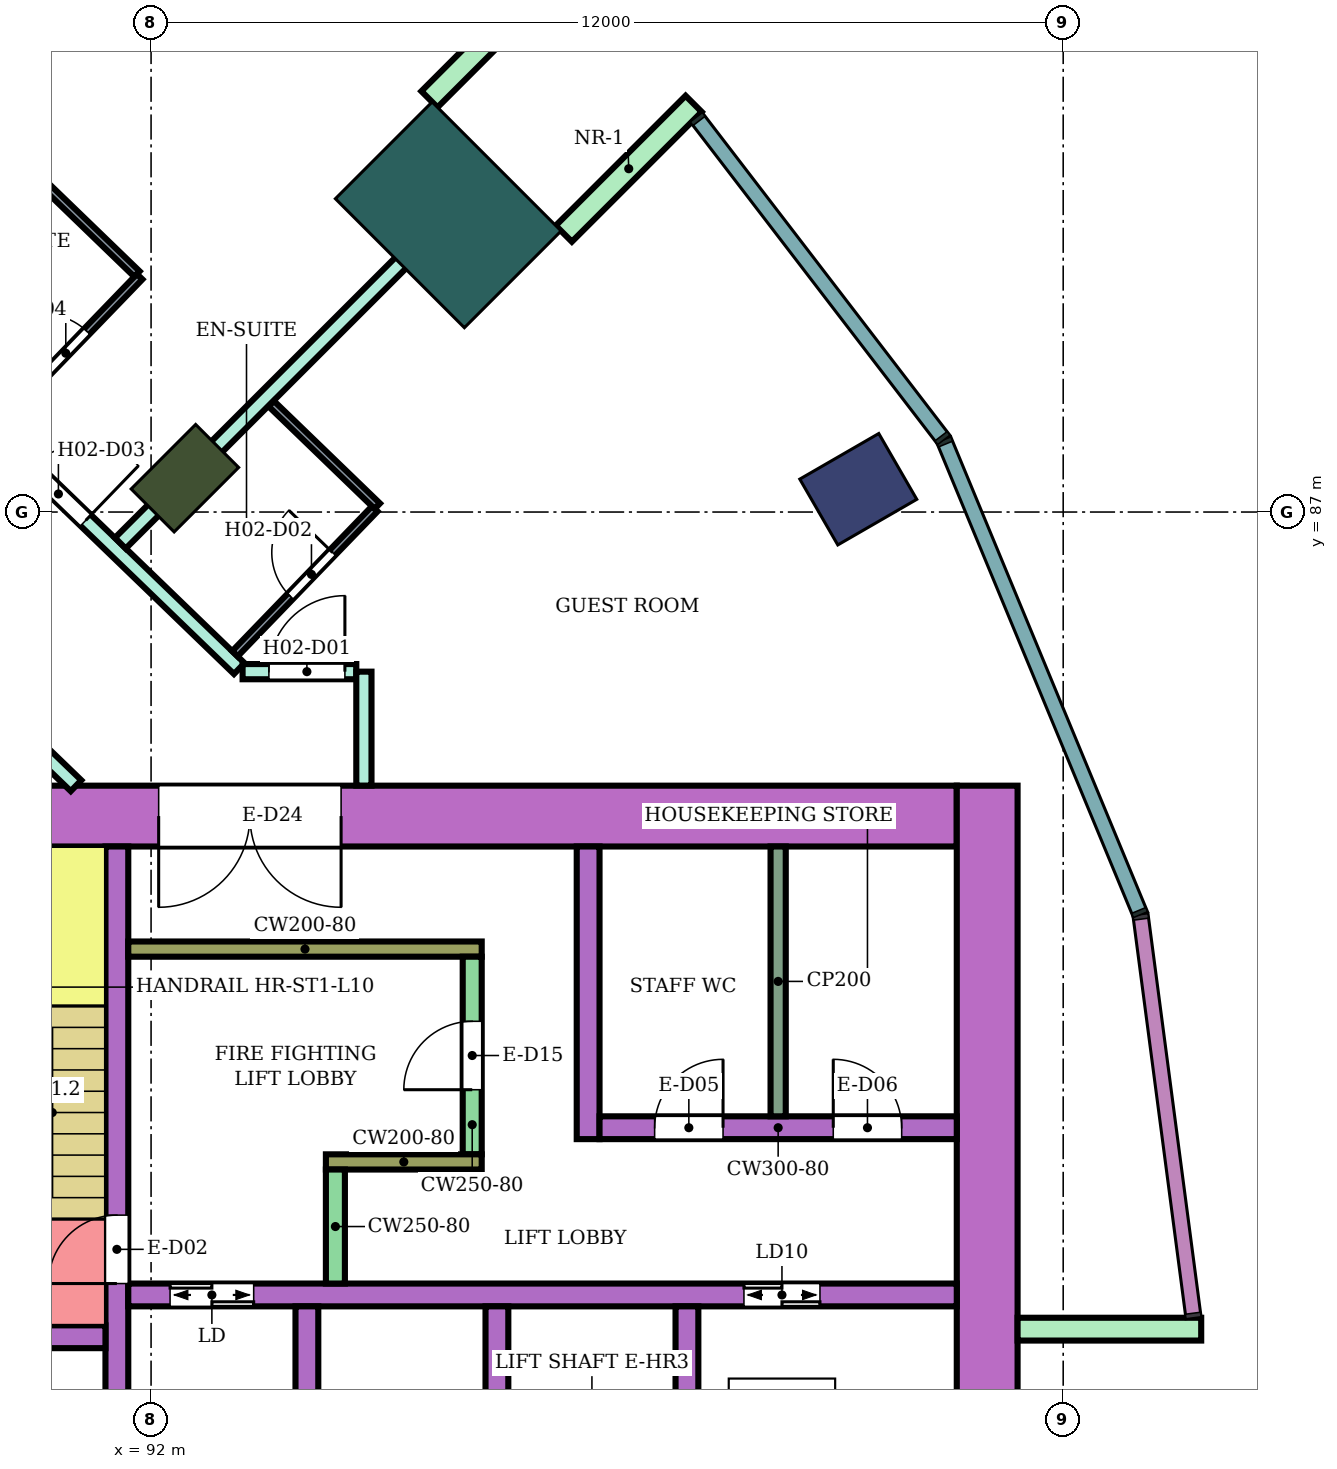
"""IFC4 building model, lengths in metres.
Left out: names, types, materials, properties, quantities, classifications, styles, units other than length and angle.
Written with IfcOpenShell. Run it as: python <this file> out.ifc"""

import sys

from ifc_helpers import new_model, si_unit, direction, frame, frame_2d, origin, origin_2d, place, context, subcontext, project, spatial, rectangle, extrude, element, fill, save


model = new_model("IFC4")
c1 = context("Model", 3, precision=1e-05, world=origin(), true_north=direction((0.0, 1.0)))
c2 = subcontext(c1, "Body", "Model", "MODEL_VIEW")
j1 = project(units=[si_unit("LENGTHUNIT", "METRE"), si_unit("PLANEANGLEUNIT", "RADIAN")], contexts=[c1])
p1 = place(None, origin())
s1 = spatial("IfcSite", under=j1, at=p1, CompositionType="ELEMENT")
p2 = place(p1, origin())
s2 = spatial("IfcBuilding", under=s1, at=p2, CompositionType="ELEMENT")
p3 = place(p2, frame((0.0, 0.0, 47.8)))
s3 = spatial("IfcBuildingStorey", under=s2, at=p3, CompositionType="ELEMENT", Elevation=47.8)
p4 = place(p3, frame((101.304, 87.3, 0.0), z_axis=(0.0, 0.0, 1.0), x_axis=(0.866025403784, 0.5, 0.0)))
e1 = element("IfcColumn", 1, at=p4, inside=s3, PredefinedType="COLUMN", context=c2, shape_type="SweptSolid", body=[
    extrude(rectangle(XDim=1.2, YDim=1.0, at=origin_2d()), origin(), (0.0, 0.0, 1.0), 3.8),
])
p5 = place(p3, frame((92.445, 87.445, 0.0), z_axis=(0.0, 0.0, 1.0), x_axis=(0.707106781187, 0.707106781187, 0.0)))
e2 = element("IfcColumn", 2, at=p5, inside=s3, PredefinedType="COLUMN", context=c2, shape_type="SweptSolid", body=[
    extrude(rectangle(XDim=1.2, YDim=0.8, at=origin_2d()), origin(), (0.0, 0.0, 1.0), 3.8),
])
p6 = place(p3, frame((95.91, 90.91, 0.0), z_axis=(0.0, 0.0, 1.0), x_axis=(0.707106781187, 0.707106781187, 0.0)))
e3 = element("IfcColumn", 3, at=p6, inside=s3, PredefinedType="COLUMN", context=c2, shape_type="SweptSolid", body=[
    extrude(rectangle(XDim=1.8, YDim=2.4, at=origin_2d()), origin(), (0.0, 0.0, 1.0), 3.8),
])
p7 = place(p3, frame((87.9, 83.0, 0.0), z_axis=(0.0, 0.0, 1.0), x_axis=(1.0, 0.0, 0.0)))
e4 = element("IfcWall", 4, at=p7, inside=s3, PredefinedType="SHEAR", context=c2, shape_type="SweptSolid", body=[
    extrude(rectangle(XDim=14.7, YDim=0.8, at=frame_2d((7.35, 0.0))), origin(), (0.0, 0.0, 1.0), 3.48),
])
p8 = place(p7, frame((4.2, 0.0, 0.0)))
e5 = element("IfcOpeningElement", 5, at=p8, cuts=e4, PredefinedType="OPENING", context=c2, shape_type="SweptSolid", body=[
    extrude(rectangle(XDim=2.4, YDim=2.4, at=frame_2d((1.2, 1.2))), frame((0.0, 0.41, 0.0), z_axis=(0.0, -1.0, 0.0), x_axis=(1.0, 0.0, 0.0)), (0.0, 0.0, 1.0), 0.82),
])
p9 = place(p3, frame((103.0, 66.6, 0.0), z_axis=(0.0, 0.0, 1.0), x_axis=(0.0, 1.0, 0.0)))
e6 = element("IfcWall", 6, at=p9, inside=s3, PredefinedType="SHEAR", context=c2, shape_type="SweptSolid", body=[
    extrude(rectangle(XDim=16.8, YDim=0.8, at=frame_2d((8.4, 0.0))), origin(), (0.0, 0.0, 1.0), 3.48),
])
p10 = place(p3, frame((91.55, 75.0, 0.0), z_axis=(0.0, 0.0, 1.0), x_axis=(0.0, 1.0, 0.0)))
e7 = element("IfcWall", 7, at=p10, inside=s3, PredefinedType="SHEAR", context=c2, shape_type="SweptSolid", body=[
    extrude(rectangle(XDim=7.6, YDim=0.3, at=frame_2d((3.8, 0.0))), origin(), (0.0, 0.0, 1.0), 3.48),
])
p11 = place(p10, frame((1.85, 0.0, 0.0)))
e8 = element("IfcOpeningElement", 8, at=p11, cuts=e7, PredefinedType="OPENING", context=c2, shape_type="SweptSolid", body=[
    extrude(rectangle(XDim=0.9, YDim=2.1, at=frame_2d((0.45, 1.05))), frame((0.0, 0.16, 0.0), z_axis=(0.0, -1.0, 0.0), x_axis=(1.0, 0.0, 0.0)), (0.0, 0.0, 1.0), 0.32),
])
p12 = place(p3, frame((88.35, 76.15, 0.0), z_axis=(0.0, 0.0, 1.0), x_axis=(1.0, 0.0, 0.0)))
e9 = element("IfcWall", 9, at=p12, inside=s3, PredefinedType="SHEAR", context=c2, shape_type="SweptSolid", body=[
    extrude(rectangle(XDim=3.05, YDim=0.3, at=frame_2d((1.525, 0.0))), origin(), (0.0, 0.0, 1.0), 3.48),
])
p13 = place(p12, frame((1.1, 0.0, 0.0)))
e10 = element("IfcOpeningElement", 10, at=p13, cuts=e9, PredefinedType="OPENING", context=c2, shape_type="SweptSolid", body=[
    extrude(rectangle(XDim=0.7, YDim=2.0, at=frame_2d((0.35, 1.0))), frame((0.0, 0.16, 0.0), z_axis=(0.0, -1.0, 0.0), x_axis=(1.0, 0.0, 0.0)), (0.0, 0.0, 1.0), 0.32),
])
p14 = place(p3, frame((91.7, 76.7, 0.0), z_axis=(0.0, 0.0, 1.0), x_axis=(1.0, 0.0, 0.0)))
e11 = element("IfcWall", 11, at=p14, inside=s3, PredefinedType="SHEAR", context=c2, shape_type="SweptSolid", body=[
    extrude(rectangle(XDim=10.9, YDim=0.3, at=frame_2d((5.45, 0.0))), origin(), (0.0, 0.0, 1.0), 3.48),
])
p15 = place(p14, frame((0.55, 0.0, 0.0)))
e12 = element("IfcOpeningElement", 12, at=p15, cuts=e11, PredefinedType="OPENING", context=c2, shape_type="SweptSolid", body=[
    extrude(rectangle(XDim=1.1, YDim=2.1, at=frame_2d((0.55, 1.05))), frame((0.0, 0.16, 0.0), z_axis=(0.0, -1.0, 0.0), x_axis=(1.0, 0.0, 0.0)), (0.0, 0.0, 1.0), 0.32),
])
p16 = place(p14, frame((8.1, 0.0, 0.0)))
e13 = element("IfcOpeningElement", 13, at=p16, cuts=e11, PredefinedType="OPENING", context=c2, shape_type="SweptSolid", body=[
    extrude(rectangle(XDim=1.0, YDim=2.1, at=frame_2d((0.5, 1.05))), frame((0.0, 0.16, 0.0), z_axis=(0.0, -1.0, 0.0), x_axis=(1.0, 0.0, 0.0)), (0.0, 0.0, 1.0), 0.32),
])
for number, where, z_axis, x_axis in (
    (14, (94.05, 74.0, 0.0), (0.0, 0.0, 1.0), (0.0, 1.0, 0.0)),
    (15, (96.55, 74.0, 0.0), (0.0, 0.0, 1.0), (0.0, 1.0, 0.0)),
    (16, (99.05, 74.0, 0.0), (0.0, 0.0, 1.0), (0.0, 1.0, 0.0)),
):
    element("IfcWall", number, at=place(p3, frame(where, z_axis=z_axis, x_axis=x_axis)), inside=s3, PredefinedType="SHEAR", context=c2, shape_type="SweptSolid", body=[
        extrude(rectangle(XDim=2.55, YDim=0.3, at=frame_2d((1.275, 0.0))), origin(), (0.0, 0.0, 1.0), 3.48),
    ])
p17 = place(p3, frame((91.7, 81.25, 0.0), z_axis=(0.0, 0.0, 1.0), x_axis=(1.0, 0.0, 0.0)))
e17 = element("IfcWall", 17, at=p17, inside=s3, PredefinedType="SHEAR", context=c2, shape_type="SweptSolid", body=[
    extrude(rectangle(XDim=4.65, YDim=0.2, at=frame_2d((2.325, 0.0))), origin(), (0.0, 0.0, 1.0), 3.48),
])
p18 = place(p3, frame((96.225, 78.55, 0.0), z_axis=(0.0, 0.0, 1.0), x_axis=(0.0, 1.0, 0.0)))
e18 = element("IfcWall", 18, at=p18, inside=s3, PredefinedType="SHEAR", context=c2, shape_type="SweptSolid", body=[
    extrude(rectangle(XDim=2.6, YDim=0.25, at=frame_2d((1.3, 0.0))), origin(), (0.0, 0.0, 1.0), 3.48),
])
p19 = place(p18, frame((0.85, 0.0, 0.0)))
e19 = element("IfcOpeningElement", 19, at=p19, cuts=e18, PredefinedType="OPENING", context=c2, shape_type="SweptSolid", body=[
    extrude(rectangle(XDim=0.9, YDim=2.1, at=frame_2d((0.45, 1.05))), frame((0.0, 0.135, 0.0), z_axis=(0.0, -1.0, 0.0), x_axis=(1.0, 0.0, 0.0)), (0.0, 0.0, 1.0), 0.27),
])
p20 = place(p3, frame((94.3, 78.45, 0.0), z_axis=(0.0, 0.0, 1.0), x_axis=(1.0, 0.0, 0.0)))
e20 = element("IfcWall", 20, at=p20, inside=s3, PredefinedType="SHEAR", context=c2, shape_type="SweptSolid", body=[
    extrude(rectangle(XDim=2.05, YDim=0.2, at=frame_2d((1.025, 0.0))), origin(), (0.0, 0.0, 1.0), 3.48),
])
p21 = place(p3, frame((94.425, 76.85, 0.0), z_axis=(0.0, 0.0, 1.0), x_axis=(0.0, 1.0, 0.0)))
e21 = element("IfcWall", 21, at=p21, inside=s3, PredefinedType="SHEAR", context=c2, shape_type="SweptSolid", body=[
    extrude(rectangle(XDim=1.5, YDim=0.25, at=frame_2d((0.75, 0.0))), origin(), (0.0, 0.0, 1.0), 3.48),
])
p22 = place(p3, frame((97.75, 78.75, 0.0), z_axis=(0.0, 0.0, 1.0), x_axis=(0.0, 1.0, 0.0)))
e22 = element("IfcWall", 22, at=p22, inside=s3, PredefinedType="SHEAR", context=c2, shape_type="SweptSolid", body=[
    extrude(rectangle(XDim=3.85, YDim=0.3, at=frame_2d((1.925, 0.0))), origin(), (0.0, 0.0, 1.0), 3.48),
])
p23 = place(p3, frame((97.9, 78.9, 0.0), z_axis=(0.0, 0.0, 1.0), x_axis=(1.0, 0.0, 0.0)))
e23 = element("IfcWall", 23, at=p23, inside=s3, PredefinedType="SHEAR", context=c2, shape_type="SweptSolid", body=[
    extrude(rectangle(XDim=4.7, YDim=0.3, at=frame_2d((2.35, 0.0))), origin(), (0.0, 0.0, 1.0), 3.48),
])
p24 = place(p23, frame((0.725, 0.0, 0.0)))
e24 = element("IfcOpeningElement", 24, at=p24, cuts=e23, PredefinedType="OPENING", context=c2, shape_type="SweptSolid", body=[
    extrude(rectangle(XDim=0.9, YDim=2.1, at=frame_2d((0.45, 1.05))), frame((0.0, 0.16, 0.0), z_axis=(0.0, -1.0, 0.0), x_axis=(1.0, 0.0, 0.0)), (0.0, 0.0, 1.0), 0.32),
])
p25 = place(p23, frame((3.075, 0.0, 0.0)))
e25 = element("IfcOpeningElement", 25, at=p25, cuts=e23, PredefinedType="OPENING", context=c2, shape_type="SweptSolid", body=[
    extrude(rectangle(XDim=0.9, YDim=2.1, at=frame_2d((0.45, 1.05))), frame((0.0, 0.16, 0.0), z_axis=(0.0, -1.0, 0.0), x_axis=(1.0, 0.0, 0.0)), (0.0, 0.0, 1.0), 0.32),
])
for number, where, z_axis, x_axis in (
    (26, (103.4, 76.25, 0.0), (0.0, 0.0, 1.0), (1.0, 0.0, 0.0)),
    (27, (97.43, 90.662, 0.0), (0.0, 0.0, 1.0), (0.707, 0.707, 0.0)),
    (28, (95.662, 92.43, 0.0), (0.0, 0.0, 1.0), (0.707, 0.707, 0.0)),
):
    element("IfcWall", number, at=place(p3, frame(where, z_axis=z_axis, x_axis=x_axis)), inside=s3, PredefinedType="NOTDEFINED", context=c2, shape_type="SweptSolid", body=[
        extrude(rectangle(XDim=2.416, YDim=0.3, at=frame_2d((1.208, 0.0))), origin(), (0.0, 0.0, 1.0), 3.8),
    ])
p26 = place(p3, frame((87.064, 87.211, 0.0), z_axis=(0.0, 0.0, 1.0), x_axis=(0.719540958932, -0.694450004262, 0.0)))
e29 = element("IfcWall", 29, at=p26, inside=s3, PredefinedType="PARTITIONING", context=c2, shape_type="SweptSolid", body=[
    extrude(rectangle(XDim=5.488, YDim=0.2, at=frame_2d((2.744, 0.0))), origin(), (0.0, 0.0, 1.0), 3.35),
])
p27 = place(p26, frame((0.55, 0.0, 0.0)))
e30 = element("IfcOpeningElement", 30, at=p27, cuts=e29, PredefinedType="OPENING", context=c2, shape_type="SweptSolid", body=[
    extrude(rectangle(XDim=1.0, YDim=2.1, at=frame_2d((0.5, 1.05))), frame((0.0, 0.11, 0.0), z_axis=(0.0, -1.0, 0.0), x_axis=(1.0, 0.0, 0.0)), (0.0, 0.0, 1.0), 0.22),
])
p28 = place(p3, frame((88.465, 89.473, 0.0), z_axis=(0.0, 0.0, 1.0), x_axis=(0.719474304909, -0.694519059908, 0.0)))
e31 = element("IfcWall", 31, at=p28, inside=s3, PredefinedType="PARTITIONING", context=c2, shape_type="SweptSolid", body=[
    extrude(rectangle(XDim=6.525, YDim=0.2, at=frame_2d((3.263, 0.0))), origin(), (0.0, 0.0, 1.0), 3.35),
])
p29 = place(p28, frame((2.719, 0.0, 0.0)))
e32 = element("IfcOpeningElement", 32, at=p29, cuts=e31, PredefinedType="OPENING", context=c2, shape_type="SweptSolid", body=[
    extrude(rectangle(XDim=1.0, YDim=2.1, at=frame_2d((0.5, 1.05))), frame((0.0, 0.11, 0.0), z_axis=(0.0, -1.0, 0.0), x_axis=(1.0, 0.0, 0.0)), (0.0, 0.0, 1.0), 0.22),
])
p30 = place(p3, frame((88.397, 89.539, 0.0), z_axis=(0.0, 0.0, 1.0), x_axis=(0.500228379329, 0.86589350876, 0.0)))
e33 = element("IfcWall", 33, at=p30, inside=s3, PredefinedType="PARTITIONING", context=c2, shape_type="SweptSolid", body=[
    extrude(rectangle(XDim=9.008, YDim=0.2, at=frame_2d((4.504, 0.0))), origin(), (0.0, 0.0, 1.0), 3.35),
])
p31 = place(p3, frame((91.595, 86.59, 0.0), z_axis=(0.0, 0.0, 1.0), x_axis=(0.707232337591, 0.706981202484, 0.0)))
e34 = element("IfcWall", 34, at=p31, inside=s3, PredefinedType="PARTITIONING", context=c2, shape_type="SweptSolid", body=[
    extrude(rectangle(XDim=6.805, YDim=0.2, at=frame_2d((3.402, 0.0))), origin(), (0.0, 0.0, 1.0), 3.35),
])
p32 = place(p3, frame((93.204, 84.9, 0.0), z_axis=(0.0, 0.0, 1.0), x_axis=(1.0, 0.0, 0.0)))
e35 = element("IfcWall", 35, at=p32, inside=s3, PredefinedType="PARTITIONING", context=c2, shape_type="SweptSolid", body=[
    extrude(rectangle(XDim=1.496, YDim=0.2, at=frame_2d((0.748, 0.0))), origin(), (0.0, 0.0, 1.0), 3.35),
])
p33 = place(p32, frame((0.346, 0.0, 0.0)))
e36 = element("IfcOpeningElement", 36, at=p33, cuts=e35, PredefinedType="OPENING", context=c2, shape_type="SweptSolid", body=[
    extrude(rectangle(XDim=1.0, YDim=2.1, at=frame_2d((0.5, 1.05))), frame((0.0, 0.11, 0.0), z_axis=(0.0, -1.0, 0.0), x_axis=(1.0, 0.0, 0.0)), (0.0, 0.0, 1.0), 0.22),
])
p34 = place(p3, frame((94.8, 83.401, 0.0), z_axis=(0.0, 0.0, 1.0), x_axis=(0.0, 1.0, 0.0)))
e37 = element("IfcWall", 37, at=p34, inside=s3, PredefinedType="PARTITIONING", context=c2, shape_type="SweptSolid", body=[
    extrude(rectangle(XDim=1.499, YDim=0.2, at=frame_2d((0.75, 0.0))), origin(), (0.0, 0.0, 1.0), 3.35),
])
p35 = place(p3, frame((89.925, 91.956, 0.0), z_axis=(0.0, 0.0, 1.0), x_axis=(0.71931338148, -0.694685726947, 0.0)))
e38 = element("IfcWall", 38, at=p35, inside=s3, PredefinedType="PARTITIONING", context=c2, shape_type="SweptSolid", body=[
    extrude(rectangle(XDim=2.627, YDim=0.1, at=frame_2d((1.313, 0.0))), origin(), (0.0, 0.0, 1.0), 3.35),
])
p36 = place(p3, frame((89.976, 88.154, 0.0), z_axis=(0.0, 0.0, 1.0), x_axis=(0.6945137956, 0.719479386585, 0.0)))
e39 = element("IfcWall", 39, at=p36, inside=s3, PredefinedType="PARTITIONING", context=c2, shape_type="SweptSolid", body=[
    extrude(rectangle(XDim=2.699, YDim=0.1, at=frame_2d((1.35, 0.0))), origin(), (0.0, 0.0, 1.0), 3.35),
])
p37 = place(p36, frame((0.9, 0.0, 0.0)))
e40 = element("IfcOpeningElement", 40, at=p37, cuts=e39, PredefinedType="OPENING", context=c2, shape_type="SweptSolid", body=[
    extrude(rectangle(XDim=0.8, YDim=2.1, at=frame_2d((0.4, 1.05))), frame((0.0, 0.06, 0.0), z_axis=(0.0, -1.0, 0.0), x_axis=(1.0, 0.0, 0.0)), (0.0, 0.0, 1.0), 0.12),
])
p38 = place(p3, frame((93.104, 85.136, 0.0), z_axis=(0.0, 0.0, 1.0), x_axis=(0.694324808789, 0.719661767708, 0.0)))
e41 = element("IfcWall", 41, at=p38, inside=s3, PredefinedType="PARTITIONING", context=c2, shape_type="SweptSolid", body=[
    extrude(rectangle(XDim=2.65, YDim=0.1, at=frame_2d((1.325, 0.0))), origin(), (0.0, 0.0, 1.0), 3.35),
])
p39 = place(p38, frame((1.05, 0.0, 0.0)))
e42 = element("IfcOpeningElement", 42, at=p39, cuts=e41, PredefinedType="OPENING", context=c2, shape_type="SweptSolid", body=[
    extrude(rectangle(XDim=0.8, YDim=2.1, at=frame_2d((0.4, 1.05))), frame((0.0, 0.06, 0.0), z_axis=(0.0, -1.0, 0.0), x_axis=(1.0, 0.0, 0.0)), (0.0, 0.0, 1.0), 0.12),
])
p40 = place(p3, frame((93.582, 88.425, 0.0), z_axis=(0.0, 0.0, 1.0), x_axis=(0.719334224501, -0.694664144361, 0.0)))
e43 = element("IfcWall", 43, at=p40, inside=s3, PredefinedType="PARTITIONING", context=c2, shape_type="SweptSolid", body=[
    extrude(rectangle(XDim=1.94, YDim=0.1, at=frame_2d((0.97, 0.0))), origin(), (0.0, 0.0, 1.0), 3.35),
])
p41 = place(p3, frame((100.25, 79.05, 0.0), z_axis=(0.0, 0.0, 1.0), x_axis=(0.0, 1.0, 0.0)))
e44 = element("IfcWall", 44, at=p41, inside=s3, PredefinedType="PARTITIONING", context=c2, shape_type="SweptSolid", body=[
    extrude(rectangle(XDim=3.55, YDim=0.2, at=frame_2d((1.775, 0.0))), origin(), (0.0, 0.0, 1.0), 3.48),
])
p42 = place(p33, origin())
e45 = element("IfcDoor", 45, at=p42, inside=s3, OperationType="SINGLE_SWING_RIGHT", PredefinedType="DOOR", context=c2, shape_type="SweptSolid", body=[
    extrude(rectangle(XDim=1.0, YDim=2.1, at=frame_2d((0.5, 1.05))), frame((0.0, 0.025, 0.0), z_axis=(0.0, -1.0, 0.0), x_axis=(1.0, 0.0, 0.0)), (0.0, 0.0, 1.0), 0.05),
])
fill(e36, e45)
p43 = place(p39, origin())
e46 = element("IfcDoor", 46, at=p43, inside=s3, OperationType="SINGLE_SWING_RIGHT", PredefinedType="DOOR", context=c2, shape_type="SweptSolid", body=[
    extrude(rectangle(XDim=0.8, YDim=2.1, at=frame_2d((0.4, 1.05))), frame((0.0, 0.025, 0.0), z_axis=(0.0, -1.0, 0.0), x_axis=(1.0, 0.0, 0.0)), (0.0, 0.0, 1.0), 0.05),
])
fill(e42, e46)
p44 = place(p29, origin())
e47 = element("IfcDoor", 47, at=p44, inside=s3, OperationType="SINGLE_SWING_RIGHT", PredefinedType="DOOR", context=c2, shape_type="SweptSolid", body=[
    extrude(rectangle(XDim=1.0, YDim=2.1, at=frame_2d((0.5, 1.05))), frame((0.0, 0.025, 0.0), z_axis=(0.0, -1.0, 0.0), x_axis=(1.0, 0.0, 0.0)), (0.0, 0.0, 1.0), 0.05),
])
fill(e32, e47)
p45 = place(p37, origin())
e48 = element("IfcDoor", 48, at=p45, inside=s3, OperationType="SINGLE_SWING_LEFT", PredefinedType="DOOR", context=c2, shape_type="SweptSolid", body=[
    extrude(rectangle(XDim=0.8, YDim=2.1, at=frame_2d((0.4, 1.05))), frame((0.0, 0.025, 0.0), z_axis=(0.0, -1.0, 0.0), x_axis=(1.0, 0.0, 0.0)), (0.0, 0.0, 1.0), 0.05),
])
fill(e40, e48)
p46 = place(p11, origin())
e49 = element("IfcDoor", 49, at=p46, inside=s3, OperationType="SINGLE_SWING_LEFT", PredefinedType="DOOR", context=c2, shape_type="SweptSolid", body=[
    extrude(rectangle(XDim=0.9, YDim=2.1, at=frame_2d((0.45, 1.05))), frame((0.0, 0.025, 0.0), z_axis=(0.0, -1.0, 0.0), x_axis=(1.0, 0.0, 0.0)), (0.0, 0.0, 1.0), 0.05),
])
fill(e8, e49)
p47 = place(p15, origin())
e50 = element("IfcDoor", 50, at=p47, inside=s3, OperationType="DOUBLE_DOOR_SLIDING", PredefinedType="DOOR", context=c2, shape_type="SweptSolid", body=[
    extrude(rectangle(XDim=1.1, YDim=2.1, at=frame_2d((0.55, 1.05))), frame((0.0, 0.025, 0.0), z_axis=(0.0, -1.0, 0.0), x_axis=(1.0, 0.0, 0.0)), (0.0, 0.0, 1.0), 0.05),
])
fill(e12, e50)
p48 = place(p16, origin())
e51 = element("IfcDoor", 51, at=p48, inside=s3, OperationType="DOUBLE_DOOR_SLIDING", PredefinedType="DOOR", context=c2, shape_type="SweptSolid", body=[
    extrude(rectangle(XDim=1.0, YDim=2.1, at=frame_2d((0.5, 1.05))), frame((0.0, 0.025, 0.0), z_axis=(0.0, -1.0, 0.0), x_axis=(1.0, 0.0, 0.0)), (0.0, 0.0, 1.0), 0.05),
])
fill(e13, e51)
p49 = place(p19, origin())
e52 = element("IfcDoor", 52, at=p49, inside=s3, OperationType="SINGLE_SWING_LEFT", PredefinedType="DOOR", context=c2, shape_type="SweptSolid", body=[
    extrude(rectangle(XDim=0.9, YDim=2.1, at=frame_2d((0.45, 1.05))), frame((0.0, 0.025, 0.0), z_axis=(0.0, -1.0, 0.0), x_axis=(1.0, 0.0, 0.0)), (0.0, 0.0, 1.0), 0.05),
])
fill(e19, e52)
p50 = place(p24, origin())
e53 = element("IfcDoor", 53, at=p50, inside=s3, OperationType="SINGLE_SWING_RIGHT", PredefinedType="DOOR", context=c2, shape_type="SweptSolid", body=[
    extrude(rectangle(XDim=0.9, YDim=2.1, at=frame_2d((0.45, 1.05))), frame((0.0, 0.025, 0.0), z_axis=(0.0, -1.0, 0.0), x_axis=(1.0, 0.0, 0.0)), (0.0, 0.0, 1.0), 0.05),
])
fill(e24, e53)
p51 = place(p25, origin())
e54 = element("IfcDoor", 54, at=p51, inside=s3, OperationType="SINGLE_SWING_LEFT", PredefinedType="DOOR", context=c2, shape_type="SweptSolid", body=[
    extrude(rectangle(XDim=0.9, YDim=2.1, at=frame_2d((0.45, 1.05))), frame((0.0, 0.025, 0.0), z_axis=(0.0, -1.0, 0.0), x_axis=(1.0, 0.0, 0.0)), (0.0, 0.0, 1.0), 0.05),
])
fill(e25, e54)
p52 = place(p8, frame((2.4, 0.0, 0.0), z_axis=(0.0, 0.0, 1.0), x_axis=(-1.0, 0.0, 0.0)))
e55 = element("IfcDoor", 55, at=p52, inside=s3, OperationType="DOUBLE_DOOR_SINGLE_SWING", PredefinedType="DOOR", context=c2, shape_type="SweptSolid", body=[
    extrude(rectangle(XDim=2.4, YDim=2.4, at=frame_2d((1.2, 1.2))), frame((0.0, 0.025, 0.0), z_axis=(0.0, -1.0, 0.0), x_axis=(1.0, 0.0, 0.0)), (0.0, 0.0, 1.0), 0.05),
])
fill(e5, e55)
save(model, sys.argv[1])
